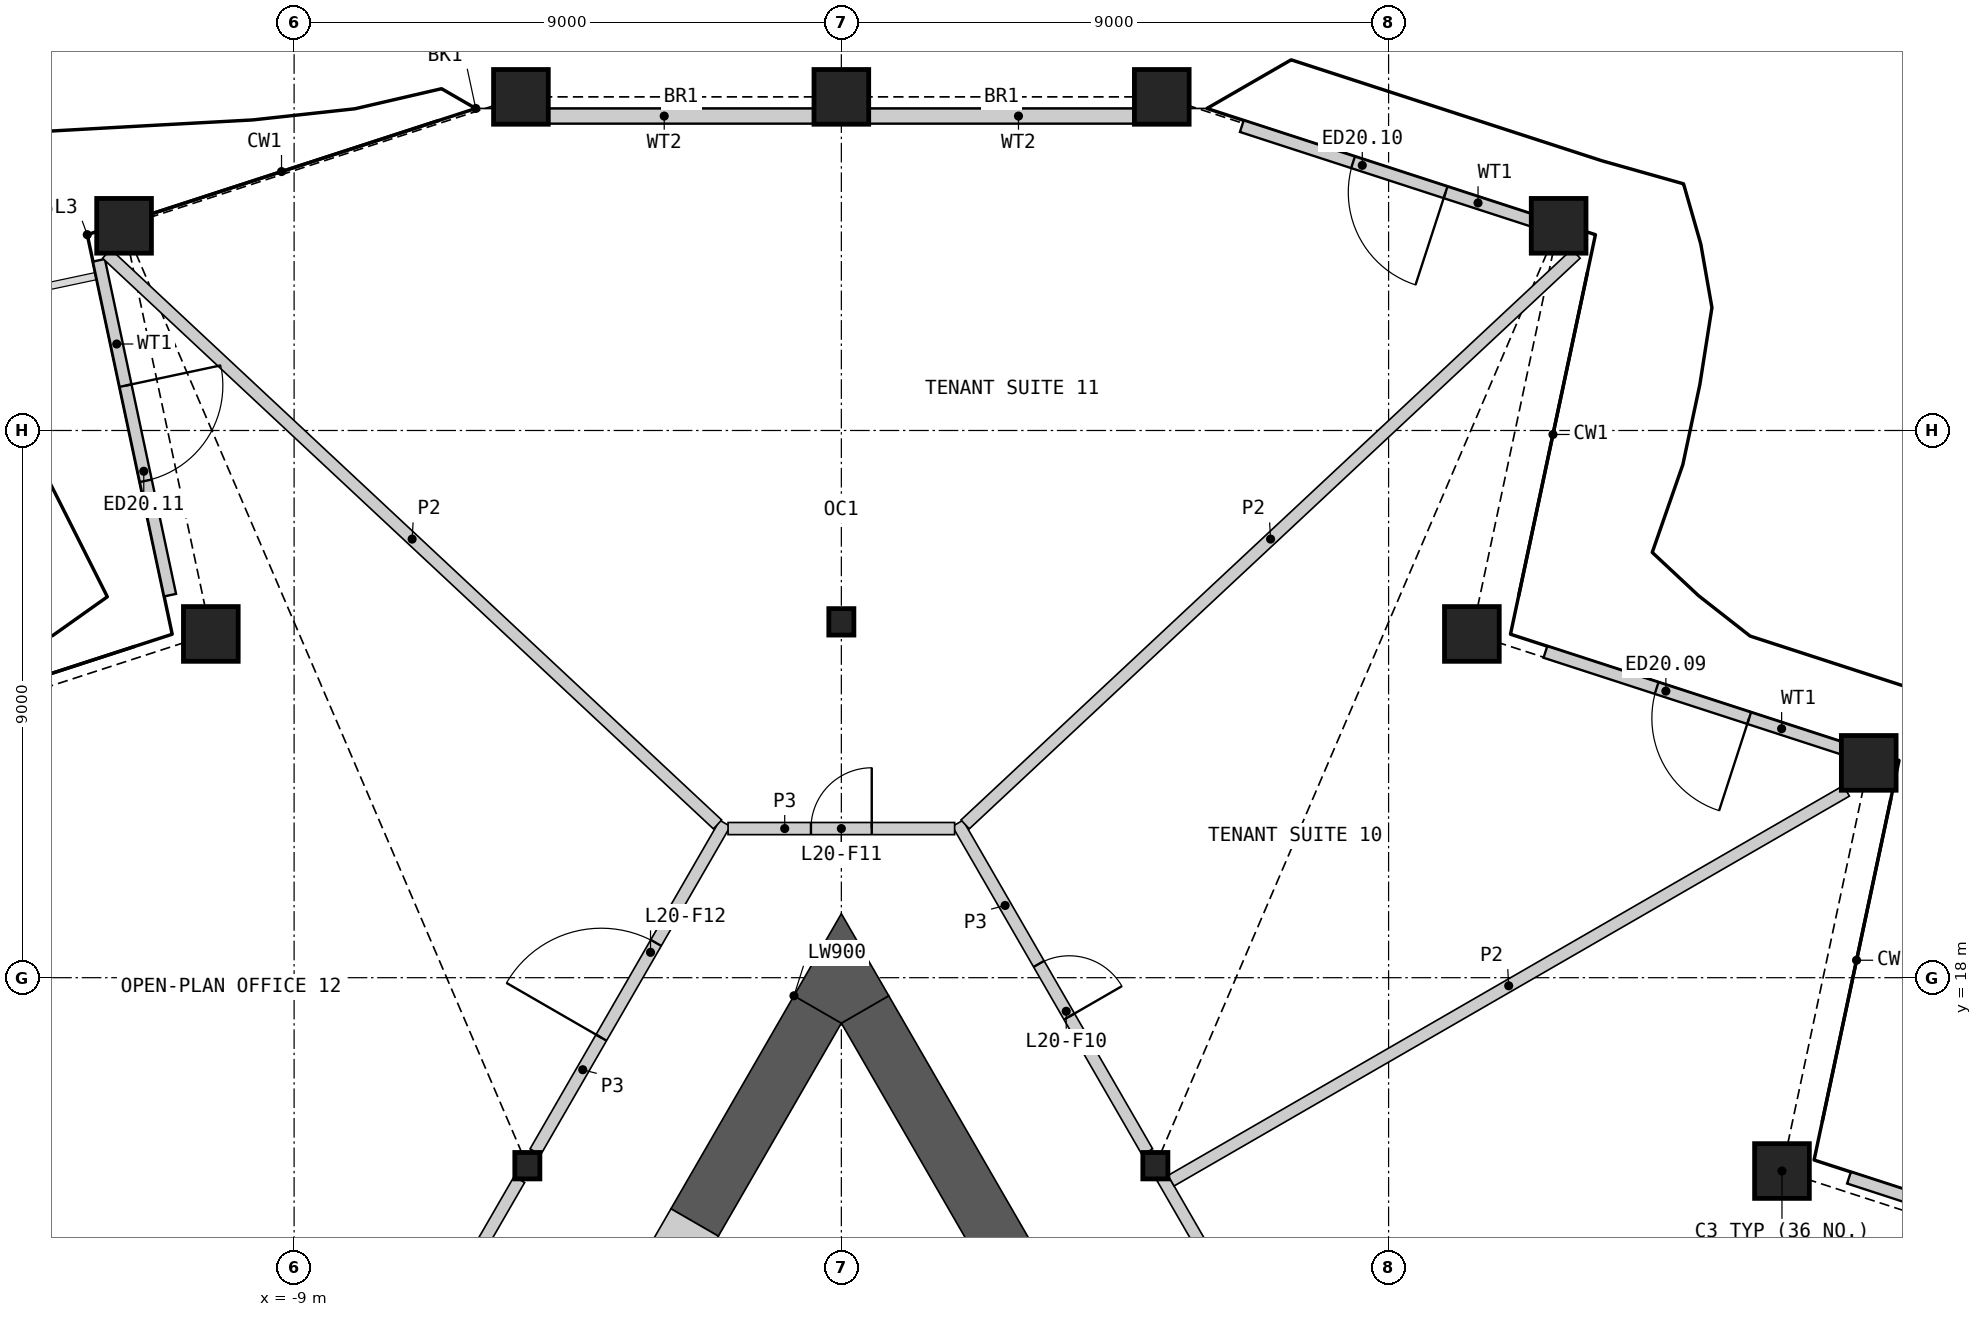
"""IFC4 building model, lengths in metres.
Left out: names, types, materials, properties, quantities, classifications, styles, units other than length and angle.
Written with IfcOpenShell. Run it as: python <this file> out.ifc"""

import sys

from ifc_helpers import new_model, si_unit, direction, frame, frame_2d, origin, origin_2d, place, context, subcontext, project, spatial, polyline, rectangle, hollow_rectangle, i_section, outline, extrude, element, fill, save


model = new_model("IFC4")
c1 = context("Model", 3, precision=1e-05, world=origin(), true_north=direction((0.0, 1.0)))
c2 = subcontext(c1, "Body", "Model", "MODEL_VIEW")
j1 = project(units=[si_unit("LENGTHUNIT", "METRE"), si_unit("PLANEANGLEUNIT", "RADIAN")], contexts=[c1])
p1 = place(None, origin())
s1 = spatial("IfcSite", under=j1, at=p1, CompositionType="ELEMENT")
p2 = place(p1, origin())
s2 = spatial("IfcBuilding", under=s1, at=p2, CompositionType="ELEMENT")
p3 = place(p2, frame((0.0, 0.0, 99.6)))
s3 = spatial("IfcBuildingStorey", under=s2, at=p3, CompositionType="ELEMENT", Elevation=99.6)
for number, where, z_axis, x_axis in (
    (1, (15.469, 14.82, 0.0), (0.0, 0.0, 1.0), (1.0, 0.0, 0.0)),
    (2, (16.896, 21.533, 0.0), (0.0, 0.0, 1.0), (1.0, 0.0, 0.0)),
    (3, (10.37, 23.654, 0.0), (0.0, 0.0, 1.0), (1.0, 0.0, 0.0)),
    (4, (11.796, 30.366, 0.0), (0.0, 0.0, 1.0), (1.0, 0.0, 0.0)),
    (5, (5.27, 32.487, 0.0), (0.0, 0.0, 1.0), (1.0, 0.0, 0.0)),
    (6, (0.0, 32.487, 0.0), (0.0, 0.0, 1.0), (1.0, 0.0, 0.0)),
    (7, (-5.27, 32.487, 0.0), (0.0, 0.0, 1.0), (1.0, 0.0, 0.0)),
    (8, (-11.796, 30.366, 0.0), (0.0, 0.0, 1.0), (1.0, 0.0, 0.0)),
    (9, (-10.37, 23.654, 0.0), (0.0, 0.0, 1.0), (1.0, 0.0, 0.0)),
):
    element("IfcColumn", number, at=place(p3, frame(where, z_axis=z_axis, x_axis=x_axis)), inside=s3, PredefinedType="COLUMN", context=c2, shape_type="SweptSolid", body=[
        extrude(hollow_rectangle(XDim=0.9, YDim=0.9, WallThickness=0.06, at=origin_2d()), origin(), (0.0, 0.0, 1.0), 4.2),
    ])
for number, where, z_axis, x_axis in (
    (10, (0.0, 23.853, 0.0), (0.0, 0.0, 1.0), (1.0, 0.0, 0.0)),
    (11, (-5.164, 14.908, 0.0), (0.0, 0.0, 1.0), (1.0, 0.0, 0.0)),
    (12, (5.164, 14.908, 0.0), (0.0, 0.0, 1.0), (1.0, 0.0, 0.0)),
):
    element("IfcColumn", number, at=place(p3, frame(where, z_axis=z_axis, x_axis=x_axis)), inside=s3, PredefinedType="COLUMN", context=c2, shape_type="SweptSolid", body=[
        extrude(i_section(OverallWidth=0.412, OverallDepth=0.435, WebThickness=0.036, FlangeThickness=0.057, at=origin_2d()), origin(), (0.0, 0.0, 1.0), 4.2),
    ])
p4 = place(p3, frame((21.751, 13.027, 0.0), z_axis=(0.0, 0.0, 1.0), x_axis=(-0.951049879841, 0.309037418534, 0.0)))
e13 = element("IfcWall", 13, at=p4, inside=s3, PredefinedType="SOLIDWALL", context=c2, shape_type="SweptSolid", body=[
    extrude(rectangle(XDim=5.446, YDim=0.2, at=frame_2d((2.723, 0.0))), origin(), (0.0, 0.0, 1.0), 3.189),
])
p5 = place(p4, frame((1.923, 0.0, 0.0)))
e14 = element("IfcOpeningElement", 14, at=p5, cuts=e13, PredefinedType="OPENING", context=c2, shape_type="SweptSolid", body=[
    extrude(rectangle(XDim=1.6, YDim=2.4, at=frame_2d((0.8, 1.2))), frame((0.0, 0.11, 0.0), z_axis=(0.0, -1.0, 0.0), x_axis=(1.0, 0.0, 0.0)), (0.0, 0.0, 1.0), 0.22),
])
p6 = place(p3, frame((16.759, 21.674, 0.0), z_axis=(0.0, 0.0, 1.0), x_axis=(-0.951049879841, 0.309037418534, 0.0)))
e15 = element("IfcWall", 15, at=p6, inside=s3, PredefinedType="SOLIDWALL", context=c2, shape_type="SweptSolid", body=[
    extrude(rectangle(XDim=5.446, YDim=0.2, at=frame_2d((2.723, 0.0))), origin(), (0.0, 0.0, 1.0), 3.189),
])
p7 = place(p6, frame((1.923, 0.0, 0.0)))
e16 = element("IfcOpeningElement", 16, at=p7, cuts=e15, PredefinedType="OPENING", context=c2, shape_type="SweptSolid", body=[
    extrude(rectangle(XDim=1.6, YDim=2.4, at=frame_2d((0.8, 1.2))), frame((0.0, 0.11, 0.0), z_axis=(0.0, -1.0, 0.0), x_axis=(1.0, 0.0, 0.0)), (0.0, 0.0, 1.0), 0.22),
])
p8 = place(p3, frame((11.766, 30.322, 0.0), z_axis=(0.0, 0.0, 1.0), x_axis=(-0.951049879841, 0.309037418534, 0.0)))
e17 = element("IfcWall", 17, at=p8, inside=s3, PredefinedType="SOLIDWALL", context=c2, shape_type="SweptSolid", body=[
    extrude(rectangle(XDim=5.446, YDim=0.2, at=frame_2d((2.723, 0.0))), origin(), (0.0, 0.0, 1.0), 3.189),
])
p9 = place(p8, frame((1.923, 0.0, 0.0)))
e18 = element("IfcOpeningElement", 18, at=p9, cuts=e17, PredefinedType="OPENING", context=c2, shape_type="SweptSolid", body=[
    extrude(rectangle(XDim=1.6, YDim=2.4, at=frame_2d((0.8, 1.2))), frame((0.0, 0.11, 0.0), z_axis=(0.0, -1.0, 0.0), x_axis=(1.0, 0.0, 0.0)), (0.0, 0.0, 1.0), 0.22),
])
for number, where, z_axis, x_axis in (
    (19, (5.376, 32.171, 0.0), (0.0, 0.0, 1.0), (-1.0, 0.0, 0.0)),
    (20, (-0.45, 32.171, 0.0), (0.0, 0.0, 1.0), (-1.0, 0.0, 0.0)),
):
    element("IfcWall", number, at=place(p3, frame(where, z_axis=z_axis, x_axis=x_axis)), inside=s3, PredefinedType="SOLIDWALL", context=c2, shape_type="SweptSolid", body=[
        extrude(rectangle(XDim=4.926, YDim=0.25, at=frame_2d((2.463, 0.0))), origin(), (0.0, 0.0, 1.0), 3.189),
    ])
p10 = place(p3, frame((-12.21, 29.799, 0.0), z_axis=(0.0, 0.0, 1.0), x_axis=(0.207917875772, -0.978146286061, 0.0)))
e21 = element("IfcWall", 21, at=p10, inside=s3, PredefinedType="SOLIDWALL", context=c2, shape_type="SweptSolid", body=[
    extrude(rectangle(XDim=5.63, YDim=0.2, at=frame_2d((2.815, 0.0))), origin(), (0.0, 0.0, 1.0), 3.189),
])
p11 = place(p10, frame((2.107, 0.0, 0.0)))
e22 = element("IfcOpeningElement", 22, at=p11, cuts=e21, PredefinedType="OPENING", context=c2, shape_type="SweptSolid", body=[
    extrude(rectangle(XDim=1.6, YDim=2.4, at=frame_2d((0.8, 1.2))), frame((0.0, 0.11, 0.0), z_axis=(0.0, -1.0, 0.0), x_axis=(1.0, 0.0, 0.0)), (0.0, 0.0, 1.0), 0.22),
])
p12 = place(p3, frame((4.296, 10.712, 0.0), z_axis=(0.0, 0.0, 1.0), x_axis=(-0.500011000363, 0.866019052629, 0.0)))
e23 = element("IfcWall", 23, at=p12, inside=s3, PredefinedType="SHEAR", context=c2, shape_type="SweptSolid", body=[
    extrude(rectangle(XDim=7.812, YDim=0.9, at=frame_2d((3.906, 0.0))), origin(), (0.0, 0.0, 1.0), 3.8),
])
p13 = place(p3, frame((-0.39, 17.478, 0.0), z_axis=(0.0, 0.0, 1.0), x_axis=(-0.500046330384, -0.865998653272, 0.0)))
e24 = element("IfcWall", 24, at=p13, inside=s3, PredefinedType="SHEAR", context=c2, shape_type="SweptSolid", body=[
    extrude(rectangle(XDim=4.045, YDim=0.9, at=frame_2d((2.023, 0.0))), origin(), (0.0, 0.0, 1.0), 3.8),
])
p14 = place(p3, origin())
e25 = element("IfcWall", 25, at=p14, inside=s3, PredefinedType="SHEAR", context=c2, shape_type="SweptSolid", body=[
    extrude(outline(polyline([(-0.779, 17.703), (0.0, 19.052), (0.779, 17.703), (0.0, 17.253), (-0.779, 17.703)])), origin(), (0.0, 0.0, 1.0), 3.8),
])
p15 = place(p3, frame((-2.413, 13.974, 0.0), z_axis=(0.0, 0.0, 1.0), x_axis=(-0.499946605688, -0.86605622881, 0.0)))
e26 = element("IfcWall", 26, at=p15, inside=s3, PredefinedType="SHEAR", context=c2, shape_type="SweptSolid", body=[
    extrude(rectangle(XDim=2.2, YDim=0.9, at=frame_2d((1.1, 0.0))), origin(), (0.0, 0.0, 1.0), 3.8),
])
p16 = place(p15, frame((0.6, 0.0, 0.0)))
e27 = element("IfcOpeningElement", 27, at=p16, cuts=e26, PredefinedType="OPENING", context=c2, shape_type="SweptSolid", body=[
    extrude(rectangle(XDim=1.0, YDim=2.1, at=frame_2d((0.5, 1.05))), frame((0.0, 0.46, 0.0), z_axis=(0.0, -1.0, 0.0), x_axis=(1.0, 0.0, 0.0)), (0.0, 0.0, 1.0), 0.92),
])
p17 = place(p3, frame((-10.197, 6.19, 0.0), z_axis=(0.0, 0.0, 1.0), x_axis=(0.500012035596, 0.866018454918, 0.0)))
e28 = element("IfcWall", 28, at=p17, inside=s3, PredefinedType="PARTITIONING", context=c2, shape_type="SweptSolid", body=[
    extrude(rectangle(XDim=9.803, YDim=0.2, at=frame_2d((4.902, 0.0))), origin(), (0.0, 0.0, 1.0), 3.8),
])
p18 = place(p3, frame((5.281, 14.706, 0.0), z_axis=(0.0, 0.0, 1.0), x_axis=(0.500000421045, -0.866025160694, 0.0)))
e29 = element("IfcWall", 29, at=p18, inside=s3, PredefinedType="PARTITIONING", context=c2, shape_type="SweptSolid", body=[
    extrude(rectangle(XDim=9.833, YDim=0.2, at=frame_2d((4.917, 0.0))), origin(), (0.0, 0.0, 1.0), 3.8),
])
p19 = place(p18, frame((4.467, 0.0, 0.0)))
e30 = element("IfcOpeningElement", 30, at=p19, cuts=e29, PredefinedType="OPENING", context=c2, shape_type="SweptSolid", body=[
    extrude(rectangle(XDim=1.0, YDim=2.1, at=frame_2d((0.5, 1.05))), frame((0.0, 0.11, 0.0), z_axis=(0.0, -1.0, 0.0), x_axis=(1.0, 0.0, 0.0)), (0.0, 0.0, 1.0), 0.22),
])
p20 = place(p3, frame((-5.033, 15.135, 0.0), z_axis=(0.0, 0.0, 1.0), x_axis=(0.499980978912, 0.866036385336, 0.0)))
e31 = element("IfcWall", 31, at=p20, inside=s3, PredefinedType="PARTITIONING", context=c2, shape_type="SweptSolid", body=[
    extrude(rectangle(XDim=6.24, YDim=0.2, at=frame_2d((3.12, 0.0))), origin(), (0.0, 0.0, 1.0), 3.8),
])
p21 = place(p20, frame((2.169, 0.0, 0.0)))
e32 = element("IfcOpeningElement", 32, at=p21, cuts=e31, PredefinedType="OPENING", context=c2, shape_type="SweptSolid", body=[
    extrude(rectangle(XDim=1.8, YDim=2.1, at=frame_2d((0.9, 1.05))), frame((0.0, 0.11, 0.0), z_axis=(0.0, -1.0, 0.0), x_axis=(1.0, 0.0, 0.0)), (0.0, 0.0, 1.0), 0.22),
])
p22 = place(p3, frame((1.913, 20.539, 0.0), z_axis=(0.0, 0.0, 1.0), x_axis=(0.499980978912, -0.866036385336, 0.0)))
e33 = element("IfcWall", 33, at=p22, inside=s3, PredefinedType="PARTITIONING", context=c2, shape_type="SweptSolid", body=[
    extrude(rectangle(XDim=6.24, YDim=0.2, at=frame_2d((3.12, 0.0))), origin(), (0.0, 0.0, 1.0), 3.8),
])
p23 = place(p22, frame((2.67, 0.0, 0.0)))
e34 = element("IfcOpeningElement", 34, at=p23, cuts=e33, PredefinedType="OPENING", context=c2, shape_type="SweptSolid", body=[
    extrude(rectangle(XDim=1.0, YDim=2.1, at=frame_2d((0.5, 1.05))), frame((0.0, 0.11, 0.0), z_axis=(0.0, -1.0, 0.0), x_axis=(1.0, 0.0, 0.0)), (0.0, 0.0, 1.0), 0.22),
])
p24 = place(p3, frame((-1.863, 20.453, 0.0), z_axis=(0.0, 0.0, 1.0), x_axis=(1.0, 0.0, 0.0)))
e35 = element("IfcWall", 35, at=p24, inside=s3, PredefinedType="PARTITIONING", context=c2, shape_type="SweptSolid", body=[
    extrude(rectangle(XDim=3.726, YDim=0.2, at=frame_2d((1.863, 0.0))), origin(), (0.0, 0.0, 1.0), 3.8),
])
p25 = place(p24, frame((1.363, 0.0, 0.0)))
e36 = element("IfcOpeningElement", 36, at=p25, cuts=e35, PredefinedType="OPENING", context=c2, shape_type="SweptSolid", body=[
    extrude(rectangle(XDim=1.0, YDim=2.1, at=frame_2d((0.5, 1.05))), frame((0.0, 0.11, 0.0), z_axis=(0.0, -1.0, 0.0), x_axis=(1.0, 0.0, 0.0)), (0.0, 0.0, 1.0), 0.22),
])
for number, where, z_axis, x_axis in (
    (37, (2.036, 20.521, 0.0), (0.0, 0.0, 1.0), (0.731, 0.683, 0.0)),
    (38, (-12.082, 29.906, 0.0), (0.0, 0.0, 1.0), (0.731, -0.683, 0.0)),
):
    element("IfcWall", number, at=place(p3, frame(where, z_axis=z_axis, x_axis=x_axis)), inside=s3, PredefinedType="PARTITIONING", context=c2, shape_type="SweptSolid", body=[
        extrude(rectangle(XDim=13.748, YDim=0.2, at=frame_2d((6.874, 0.0))), origin(), (0.0, 0.0, 1.0), 2.885),
    ])
p26 = place(p3, frame((5.422, 14.661, 0.0), z_axis=(0.0, 0.0, 1.0), x_axis=(0.866023907196, 0.500002592159, 0.0)))
e39 = element("IfcWall", 39, at=p26, inside=s3, PredefinedType="PARTITIONING", context=c2, shape_type="SweptSolid", body=[
    extrude(rectangle(XDim=12.825, YDim=0.2, at=frame_2d((6.412, 0.0))), origin(), (0.0, 0.0, 1.0), 2.885),
])
p27 = place(p3, frame((-15.01, 14.431, 0.0), z_axis=(0.0, 0.0, 1.0), x_axis=(0.866019738461, -0.5000098125, 0.0)))
e40 = element("IfcWall", 40, at=p27, inside=s3, PredefinedType="PARTITIONING", context=c2, shape_type="SweptSolid", body=[
    extrude(rectangle(XDim=8.188, YDim=0.2, at=frame_2d((4.094, 0.0))), origin(), (0.0, 0.0, 1.0), 2.885),
])
p28 = place(p7, origin())
e41 = element("IfcDoor", 41, at=p28, inside=s3, OperationType="DOUBLE_DOOR_SINGLE_SWING", PredefinedType="DOOR", context=c2, shape_type="SweptSolid", body=[
    extrude(rectangle(XDim=1.6, YDim=2.4, at=frame_2d((0.8, 1.2))), frame((0.0, 0.025, 0.0), z_axis=(0.0, -1.0, 0.0), x_axis=(1.0, 0.0, 0.0)), (0.0, 0.0, 1.0), 0.05),
])
fill(e16, e41)
p29 = place(p9, origin())
e42 = element("IfcDoor", 42, at=p29, inside=s3, OperationType="DOUBLE_DOOR_SINGLE_SWING", PredefinedType="DOOR", context=c2, shape_type="SweptSolid", body=[
    extrude(rectangle(XDim=1.6, YDim=2.4, at=frame_2d((0.8, 1.2))), frame((0.0, 0.025, 0.0), z_axis=(0.0, -1.0, 0.0), x_axis=(1.0, 0.0, 0.0)), (0.0, 0.0, 1.0), 0.05),
])
fill(e18, e42)
p30 = place(p11, origin())
e43 = element("IfcDoor", 43, at=p30, inside=s3, OperationType="DOUBLE_DOOR_SINGLE_SWING", PredefinedType="DOOR", context=c2, shape_type="SweptSolid", body=[
    extrude(rectangle(XDim=1.6, YDim=2.4, at=frame_2d((0.8, 1.2))), frame((0.0, 0.025, 0.0), z_axis=(0.0, -1.0, 0.0), x_axis=(1.0, 0.0, 0.0)), (0.0, 0.0, 1.0), 0.05),
])
fill(e22, e43)
p31 = place(p23, origin())
e44 = element("IfcDoor", 44, at=p31, inside=s3, OperationType="SINGLE_SWING_RIGHT", PredefinedType="DOOR", context=c2, shape_type="SweptSolid", body=[
    extrude(rectangle(XDim=1.0, YDim=2.1, at=frame_2d((0.5, 1.05))), frame((0.0, 0.025, 0.0), z_axis=(0.0, -1.0, 0.0), x_axis=(1.0, 0.0, 0.0)), (0.0, 0.0, 1.0), 0.05),
])
fill(e34, e44)
p32 = place(p25, origin())
e45 = element("IfcDoor", 45, at=p32, inside=s3, OperationType="SINGLE_SWING_RIGHT", PredefinedType="DOOR", context=c2, shape_type="SweptSolid", body=[
    extrude(rectangle(XDim=1.0, YDim=2.1, at=frame_2d((0.5, 1.05))), frame((0.0, 0.025, 0.0), z_axis=(0.0, -1.0, 0.0), x_axis=(1.0, 0.0, 0.0)), (0.0, 0.0, 1.0), 0.05),
])
fill(e36, e45)
p33 = place(p21, origin())
e46 = element("IfcDoor", 46, at=p33, inside=s3, OperationType="DOUBLE_DOOR_SINGLE_SWING", PredefinedType="DOOR", context=c2, shape_type="SweptSolid", body=[
    extrude(rectangle(XDim=1.8, YDim=2.1, at=frame_2d((0.9, 1.05))), frame((0.0, 0.025, 0.0), z_axis=(0.0, -1.0, 0.0), x_axis=(1.0, 0.0, 0.0)), (0.0, 0.0, 1.0), 0.05),
])
fill(e32, e46)
save(model, sys.argv[1])
